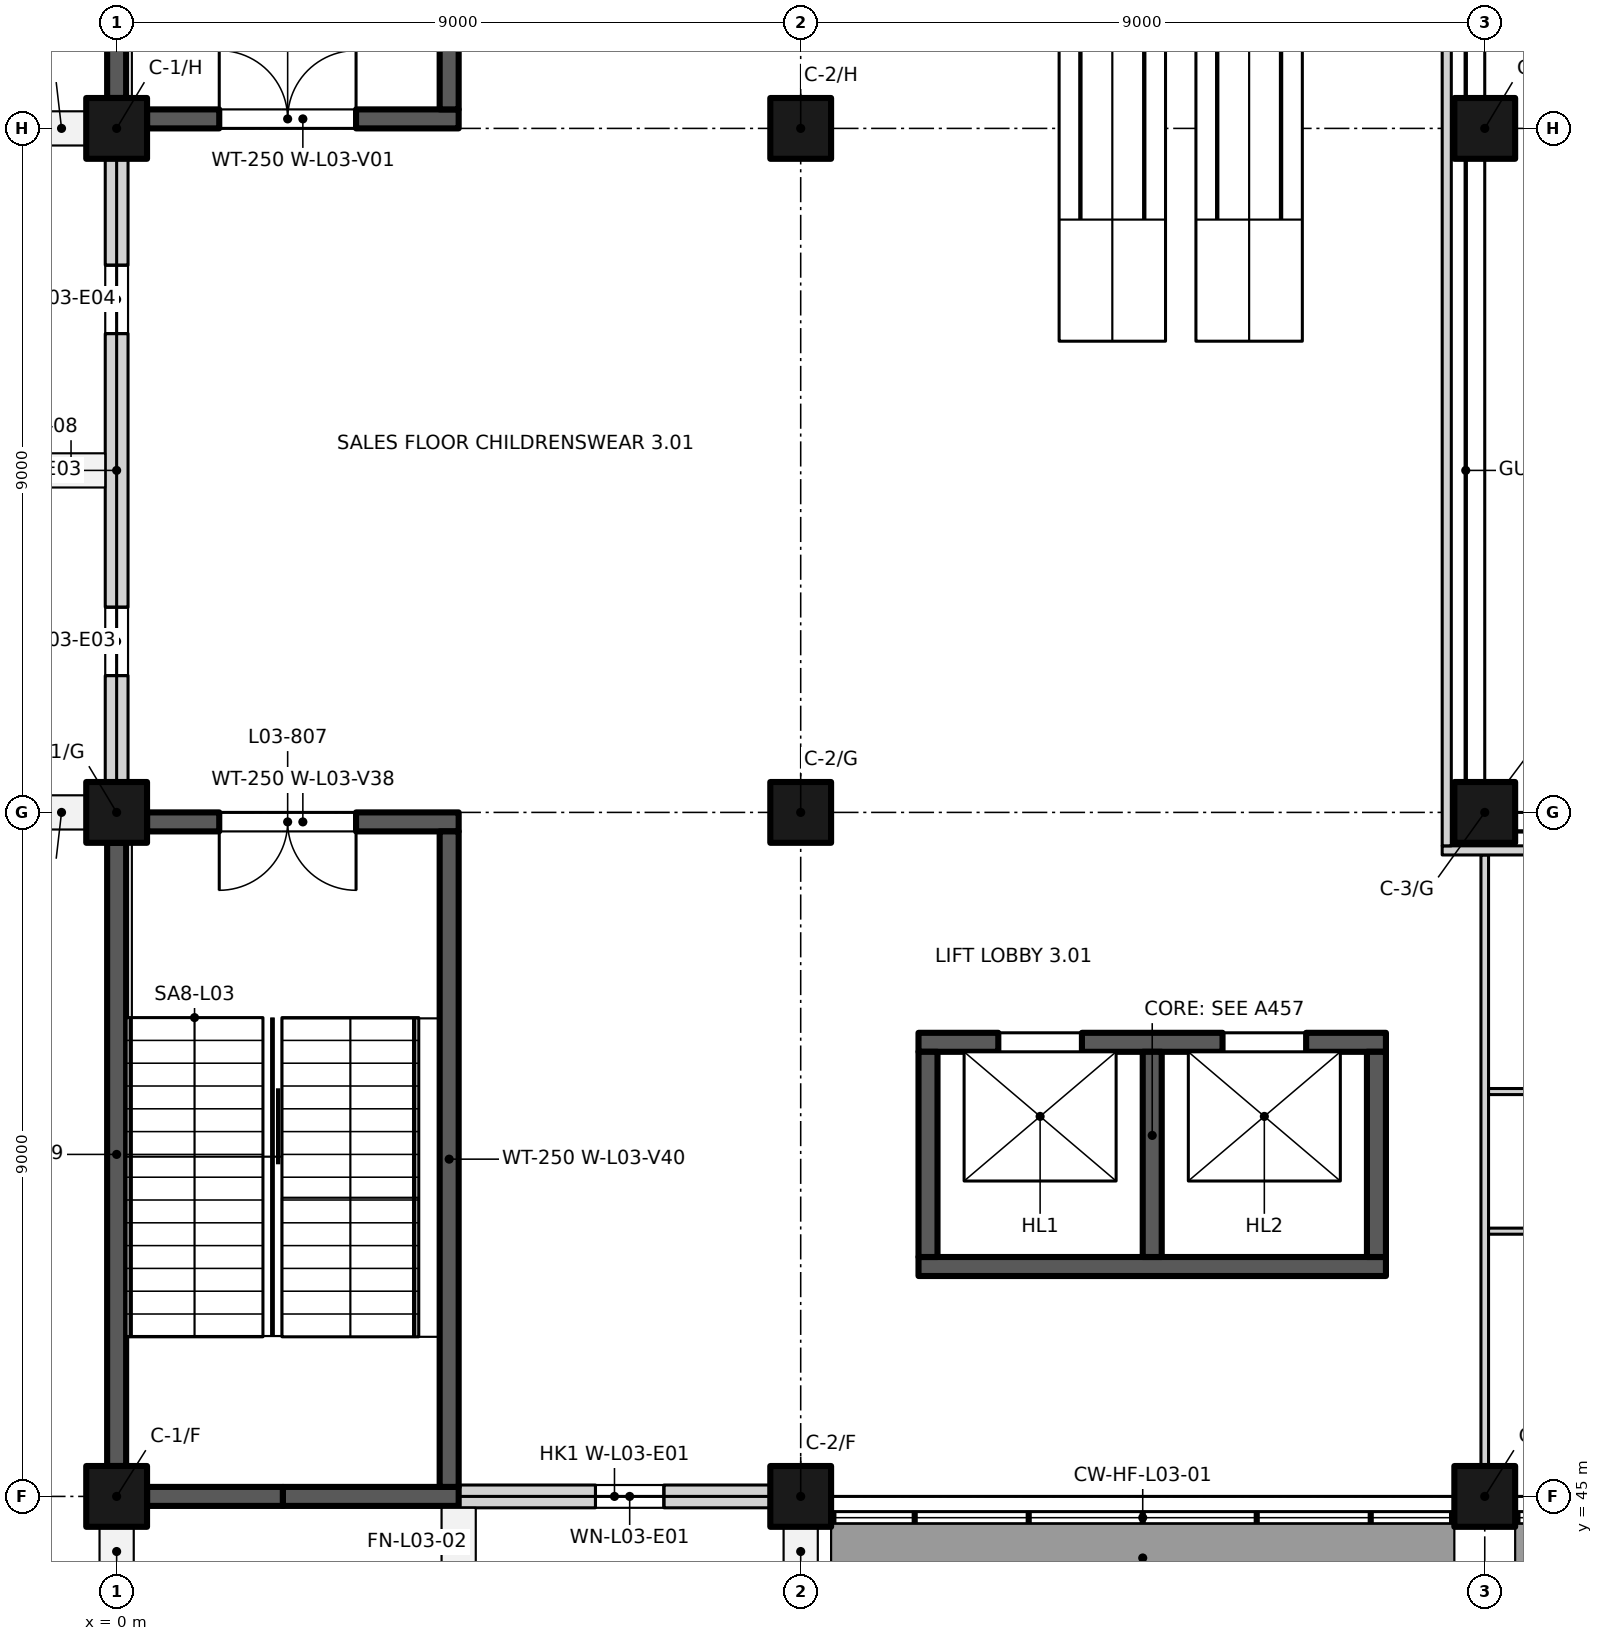
"""IFC4 building model, lengths in metres.
Left out: names, types, materials, properties, quantities, classifications, styles, units other than length and angle.
Written with IfcOpenShell. Run it as: python <this file> out.ifc"""

import sys

from ifc_helpers import new_model, si_unit, direction, frame, frame_2d, origin, origin_2d, place, context, subcontext, project, spatial, rectangle, extrude, element, fill, save


model = new_model("IFC4")
c1 = context("Model", 3, precision=1e-05, world=origin(), true_north=direction((0.0, 1.0)))
c2 = subcontext(c1, "Body", "Model", "MODEL_VIEW")
j1 = project(units=[si_unit("LENGTHUNIT", "METRE"), si_unit("PLANEANGLEUNIT", "RADIAN")], contexts=[c1])
p1 = place(None, origin())
s1 = spatial("IfcSite", under=j1, at=p1, CompositionType="ELEMENT")
p2 = place(p1, origin())
s2 = spatial("IfcBuilding", under=s1, at=p2, CompositionType="ELEMENT")
p3 = place(p2, frame((0.0, 0.0, 15.0)))
s3 = spatial("IfcBuildingStorey", under=s2, at=p3, CompositionType="ELEMENT", Elevation=15.0)
for number, where, z_axis, x_axis in (
    (1, (0.0, 45.0, 0.0), (0.0, 0.0, 1.0), (1.0, 0.0, 0.0)),
    (2, (9.0, 45.0, 0.0), (0.0, 0.0, 1.0), (1.0, 0.0, 0.0)),
    (3, (18.0, 45.0, 0.0), (0.0, 0.0, 1.0), (1.0, 0.0, 0.0)),
    (4, (0.0, 54.0, 0.0), (0.0, 0.0, 1.0), (1.0, 0.0, 0.0)),
    (5, (9.0, 54.0, 0.0), (0.0, 0.0, 1.0), (1.0, 0.0, 0.0)),
    (6, (18.0, 54.0, 0.0), (0.0, 0.0, 1.0), (1.0, 0.0, 0.0)),
    (7, (0.0, 63.0, 0.0), (0.0, 0.0, 1.0), (1.0, 0.0, 0.0)),
    (8, (9.0, 63.0, 0.0), (0.0, 0.0, 1.0), (1.0, 0.0, 0.0)),
    (9, (18.0, 63.0, 0.0), (0.0, 0.0, 1.0), (1.0, 0.0, 0.0)),
):
    element("IfcColumn", number, at=place(p3, frame(where, z_axis=z_axis, x_axis=x_axis)), inside=s3, PredefinedType="COLUMN", context=c2, shape_type="SweptSolid", body=[
        extrude(rectangle(XDim=0.8, YDim=0.8, at=origin_2d()), origin(), (0.0, 0.0, 1.0), 4.5),
    ])
p4 = place(p3, frame((0.4, 63.125, 0.0), z_axis=(0.0, 0.0, 1.0), x_axis=(1.0, 0.0, 0.0)))
e10 = element("IfcWall", 10, at=p4, inside=s3, PredefinedType="SHEAR", context=c2, shape_type="SweptSolid", body=[
    extrude(rectangle(XDim=4.1, YDim=0.25, at=frame_2d((2.05, 0.0))), origin(), (0.0, 0.0, 1.0), 4.5),
])
p5 = place(p4, frame((0.95, 0.0, 0.0)))
e11 = element("IfcOpeningElement", 11, at=p5, cuts=e10, PredefinedType="OPENING", context=c2, shape_type="SweptSolid", body=[
    extrude(rectangle(XDim=1.8, YDim=2.1, at=frame_2d((0.9, 1.05))), frame((0.0, 0.135, 0.0), z_axis=(0.0, -1.0, 0.0), x_axis=(1.0, 0.0, 0.0)), (0.0, 0.0, 1.0), 0.27),
])
p6 = place(p3, frame((0.0, 63.4, 0.0), z_axis=(0.0, 0.0, 1.0), x_axis=(0.0, 1.0, 0.0)))
e12 = element("IfcWall", 12, at=p6, inside=s3, PredefinedType="SHEAR", context=c2, shape_type="SweptSolid", body=[
    extrude(rectangle(XDim=8.2, YDim=0.25, at=frame_2d((4.1, 0.0))), origin(), (0.0, 0.0, 1.0), 4.5),
])
p7 = place(p3, frame((4.375, 63.25, 0.0), z_axis=(0.0, 0.0, 1.0), x_axis=(0.0, 1.0, 0.0)))
e13 = element("IfcWall", 13, at=p7, inside=s3, PredefinedType="SHEAR", context=c2, shape_type="SweptSolid", body=[
    extrude(rectangle(XDim=8.5, YDim=0.25, at=frame_2d((4.25, 0.0))), origin(), (0.0, 0.0, 1.0), 4.5),
])
p8 = place(p3, frame((0.4, 45.0, 0.0), z_axis=(0.0, 0.0, 1.0), x_axis=(1.0, 0.0, 0.0)))
e14 = element("IfcWall", 14, at=p8, inside=s3, PredefinedType="SHEAR", context=c2, shape_type="SweptSolid", body=[
    extrude(rectangle(XDim=1.788, YDim=0.25, at=frame_2d((0.894, 0.0))), origin(), (0.0, 0.0, 1.0), 4.5),
])
p9 = place(p3, frame((2.188, 45.0, 0.0), z_axis=(0.0, 0.0, 1.0), x_axis=(1.0, 0.0, 0.0)))
e15 = element("IfcWall", 15, at=p9, inside=s3, PredefinedType="SHEAR", context=c2, shape_type="SweptSolid", body=[
    extrude(rectangle(XDim=2.312, YDim=0.25, at=frame_2d((1.156, 0.0))), origin(), (0.0, 0.0, 1.0), 4.5),
])
p10 = place(p3, frame((0.4, 53.875, 0.0), z_axis=(0.0, 0.0, 1.0), x_axis=(1.0, 0.0, 0.0)))
e16 = element("IfcWall", 16, at=p10, inside=s3, PredefinedType="SHEAR", context=c2, shape_type="SweptSolid", body=[
    extrude(rectangle(XDim=4.1, YDim=0.25, at=frame_2d((2.05, 0.0))), origin(), (0.0, 0.0, 1.0), 4.5),
])
p11 = place(p10, frame((2.75, 0.0, 0.0), z_axis=(0.0, 0.0, 1.0), x_axis=(-1.0, 0.0, 0.0)))
e17 = element("IfcOpeningElement", 17, at=p11, cuts=e16, PredefinedType="OPENING", context=c2, shape_type="SweptSolid", body=[
    extrude(rectangle(XDim=1.8, YDim=2.1, at=frame_2d((0.9, 1.05))), frame((0.0, 0.135, 0.0), z_axis=(0.0, -1.0, 0.0), x_axis=(1.0, 0.0, 0.0)), (0.0, 0.0, 1.0), 0.27),
])
p12 = place(p3, frame((0.0, 45.4, 0.0), z_axis=(0.0, 0.0, 1.0), x_axis=(0.0, 1.0, 0.0)))
e18 = element("IfcWall", 18, at=p12, inside=s3, PredefinedType="SHEAR", context=c2, shape_type="SweptSolid", body=[
    extrude(rectangle(XDim=8.2, YDim=0.25, at=frame_2d((4.1, 0.0))), origin(), (0.0, 0.0, 1.0), 4.5),
])
p13 = place(p3, frame((4.375, 45.125, 0.0), z_axis=(0.0, 0.0, 1.0), x_axis=(0.0, 1.0, 0.0)))
e19 = element("IfcWall", 19, at=p13, inside=s3, PredefinedType="SHEAR", context=c2, shape_type="SweptSolid", body=[
    extrude(rectangle(XDim=8.625, YDim=0.25, at=frame_2d((4.312, 0.0))), origin(), (0.0, 0.0, 1.0), 4.5),
])
p14 = place(p3, frame((10.55, 50.975, 0.0), z_axis=(0.0, 0.0, 1.0), x_axis=(1.0, 0.0, 0.0)))
e20 = element("IfcWall", 20, at=p14, inside=s3, PredefinedType="SHEAR", context=c2, shape_type="SweptSolid", body=[
    extrude(rectangle(XDim=6.15, YDim=0.25, at=frame_2d((3.075, 0.0))), origin(), (0.0, 0.0, 1.0), 4.5),
])
p15 = place(p14, frame((1.05, 0.0, 0.0)))
e21 = element("IfcOpeningElement", 21, at=p15, cuts=e20, PredefinedType="OPENING", context=c2, shape_type="SweptSolid", body=[
    extrude(rectangle(XDim=1.1, YDim=2.1, at=frame_2d((0.55, 1.05))), frame((0.0, 0.135, 0.0), z_axis=(0.0, -1.0, 0.0), x_axis=(1.0, 0.0, 0.0)), (0.0, 0.0, 1.0), 0.27),
])
p16 = place(p14, frame((4.0, 0.0, 0.0)))
e22 = element("IfcOpeningElement", 22, at=p16, cuts=e20, PredefinedType="OPENING", context=c2, shape_type="SweptSolid", body=[
    extrude(rectangle(XDim=1.1, YDim=2.1, at=frame_2d((0.55, 1.05))), frame((0.0, 0.135, 0.0), z_axis=(0.0, -1.0, 0.0), x_axis=(1.0, 0.0, 0.0)), (0.0, 0.0, 1.0), 0.27),
])
p17 = place(p3, frame((10.55, 48.025, 0.0), z_axis=(0.0, 0.0, 1.0), x_axis=(1.0, 0.0, 0.0)))
e23 = element("IfcWall", 23, at=p17, inside=s3, PredefinedType="SHEAR", context=c2, shape_type="SweptSolid", body=[
    extrude(rectangle(XDim=6.15, YDim=0.25, at=frame_2d((3.075, 0.0))), origin(), (0.0, 0.0, 1.0), 4.5),
])
for number, where, z_axis, x_axis in (
    (24, (10.675, 48.15, 0.0), (0.0, 0.0, 1.0), (0.0, 1.0, 0.0)),
    (25, (13.625, 48.15, 0.0), (0.0, 0.0, 1.0), (0.0, 1.0, 0.0)),
    (26, (16.575, 48.15, 0.0), (0.0, 0.0, 1.0), (0.0, 1.0, 0.0)),
):
    element("IfcWall", number, at=place(p3, frame(where, z_axis=z_axis, x_axis=x_axis)), inside=s3, PredefinedType="SHEAR", context=c2, shape_type="SweptSolid", body=[
        extrude(rectangle(XDim=2.7, YDim=0.25, at=frame_2d((1.35, 0.0))), origin(), (0.0, 0.0, 1.0), 4.5),
    ])
p18 = place(p3, frame((8.6, 45.0, 0.0), z_axis=(0.0, 0.0, 1.0), x_axis=(-1.0, 0.0, 0.0)))
e27 = element("IfcWall", 27, at=p18, inside=s3, PredefinedType="SOLIDWALL", context=c2, shape_type="SweptSolid", body=[
    extrude(rectangle(XDim=4.1, YDim=0.3, at=frame_2d((2.05, 0.0))), origin(), (0.0, 0.0, 1.0), 3.7),
])
p19 = place(p18, frame((1.4, 0.0, 0.45)))
e28 = element("IfcOpeningElement", 28, at=p19, cuts=e27, PredefinedType="OPENING", context=c2, shape_type="SweptSolid", body=[
    extrude(rectangle(XDim=0.9, YDim=3.0, at=frame_2d((0.45, 1.5))), frame((0.0, 0.16, 0.0), z_axis=(0.0, -1.0, 0.0), x_axis=(1.0, 0.0, 0.0)), (0.0, 0.0, 1.0), 0.32),
])
p20 = place(p3, frame((0.0, 54.4, 0.0), z_axis=(0.0, 0.0, 1.0), x_axis=(0.0, 1.0, 0.0)))
e29 = element("IfcWall", 29, at=p20, inside=s3, PredefinedType="SOLIDWALL", context=c2, shape_type="SweptSolid", body=[
    extrude(rectangle(XDim=8.2, YDim=0.3, at=frame_2d((4.1, 0.0))), origin(), (0.0, 0.0, 1.0), 3.7),
])
p21 = place(p20, frame((1.4, 0.0, 0.45)))
e30 = element("IfcOpeningElement", 30, at=p21, cuts=e29, PredefinedType="OPENING", context=c2, shape_type="SweptSolid", body=[
    extrude(rectangle(XDim=0.9, YDim=3.0, at=frame_2d((0.45, 1.5))), frame((0.0, 0.16, 0.0), z_axis=(0.0, -1.0, 0.0), x_axis=(1.0, 0.0, 0.0)), (0.0, 0.0, 1.0), 0.32),
])
p22 = place(p20, frame((5.9, 0.0, 0.45)))
e31 = element("IfcOpeningElement", 31, at=p22, cuts=e29, PredefinedType="OPENING", context=c2, shape_type="SweptSolid", body=[
    extrude(rectangle(XDim=0.9, YDim=3.0, at=frame_2d((0.45, 1.5))), frame((0.0, 0.16, 0.0), z_axis=(0.0, -1.0, 0.0), x_axis=(1.0, 0.0, 0.0)), (0.0, 0.0, 1.0), 0.32),
])
p23 = place(p3, frame((18.0, 45.4, 0.0), z_axis=(0.0, 0.0, 1.0), x_axis=(0.0, 1.0, 0.0)))
e32 = element("IfcWall", 32, at=p23, inside=s3, PredefinedType="PARTITIONING", context=c2, shape_type="SweptSolid", body=[
    extrude(rectangle(XDim=8.04, YDim=0.1, at=frame_2d((4.02, 0.0))), origin(), (0.0, 0.0, 1.0), 3.7),
])
for number, where, z_axis, x_axis in (
    (33, (18.05, 48.49, 0.0), (0.0, 0.0, 1.0), (1.0, 0.0, 0.0)),
    (34, (18.05, 50.327, 0.0), (0.0, 0.0, 1.0), (1.0, 0.0, 0.0)),
):
    element("IfcWall", number, at=place(p3, frame(where, z_axis=z_axis, x_axis=x_axis)), inside=s3, PredefinedType="PARTITIONING", context=c2, shape_type="SweptSolid", body=[
        extrude(rectangle(XDim=5.9, YDim=0.08, at=frame_2d((2.95, 0.0))), origin(), (0.0, 0.0, 1.0), 3.7),
    ])
p24 = place(p3, frame((17.44, 53.5, 0.0), z_axis=(0.0, 0.0, 1.0), x_axis=(1.0, 0.0, 0.0)))
e35 = element("IfcWall", 35, at=p24, inside=s3, PredefinedType="PARTITIONING", context=c2, shape_type="SweptSolid", body=[
    extrude(rectangle(XDim=28.12, YDim=0.12, at=frame_2d((14.06, 0.0))), origin(), (0.0, 0.0, 1.0), 3.7),
])
p25 = place(p3, frame((17.5, 53.56, 0.0), z_axis=(0.0, 0.0, 1.0), x_axis=(0.0, 1.0, 0.0)))
e36 = element("IfcWall", 36, at=p25, inside=s3, PredefinedType="PARTITIONING", context=c2, shape_type="SweptSolid", body=[
    extrude(rectangle(XDim=36.565, YDim=0.12, at=frame_2d((18.282, 0.0))), origin(), (0.0, 0.0, 1.0), 3.7),
])
p26 = place(p5, origin())
e37 = element("IfcDoor", 37, at=p26, inside=s3, OperationType="DOUBLE_DOOR_SINGLE_SWING", PredefinedType="DOOR", context=c2, shape_type="SweptSolid", body=[
    extrude(rectangle(XDim=1.8, YDim=2.1, at=frame_2d((0.9, 1.05))), frame((0.0, 0.025, 0.0), z_axis=(0.0, -1.0, 0.0), x_axis=(1.0, 0.0, 0.0)), (0.0, 0.0, 1.0), 0.05),
])
fill(e11, e37)
p27 = place(p11, origin())
e38 = element("IfcDoor", 38, at=p27, inside=s3, OperationType="DOUBLE_DOOR_SINGLE_SWING", PredefinedType="DOOR", context=c2, shape_type="SweptSolid", body=[
    extrude(rectangle(XDim=1.8, YDim=2.1, at=frame_2d((0.9, 1.05))), frame((0.0, 0.025, 0.0), z_axis=(0.0, -1.0, 0.0), x_axis=(1.0, 0.0, 0.0)), (0.0, 0.0, 1.0), 0.05),
])
fill(e17, e38)
p28 = place(p15, origin())
e39 = element("IfcDoor", 39, at=p28, inside=s3, OperationType="DOUBLE_DOOR_SLIDING", PredefinedType="DOOR", context=c2, shape_type="SweptSolid", body=[
    extrude(rectangle(XDim=1.1, YDim=2.1, at=frame_2d((0.55, 1.05))), frame((0.0, 0.025, 0.0), z_axis=(0.0, -1.0, 0.0), x_axis=(1.0, 0.0, 0.0)), (0.0, 0.0, 1.0), 0.05),
])
fill(e21, e39)
p29 = place(p16, origin())
e40 = element("IfcDoor", 40, at=p29, inside=s3, OperationType="DOUBLE_DOOR_SLIDING", PredefinedType="DOOR", context=c2, shape_type="SweptSolid", body=[
    extrude(rectangle(XDim=1.1, YDim=2.1, at=frame_2d((0.55, 1.05))), frame((0.0, 0.025, 0.0), z_axis=(0.0, -1.0, 0.0), x_axis=(1.0, 0.0, 0.0)), (0.0, 0.0, 1.0), 0.05),
])
fill(e22, e40)
p30 = place(p19, origin())
e41 = element("IfcWindow", 41, at=p30, inside=s3, PartitioningType="SINGLE_PANEL", PredefinedType="WINDOW", context=c2, shape_type="SweptSolid", body=[
    extrude(rectangle(XDim=0.9, YDim=3.0, at=frame_2d((0.45, 1.5))), frame((0.0, -0.03, 0.0), z_axis=(0.0, -1.0, 0.0), x_axis=(1.0, 0.0, 0.0)), (0.0, 0.0, 1.0), 0.06),
])
fill(e28, e41)
p31 = place(p21, origin())
e42 = element("IfcWindow", 42, at=p31, inside=s3, PartitioningType="SINGLE_PANEL", PredefinedType="WINDOW", context=c2, shape_type="SweptSolid", body=[
    extrude(rectangle(XDim=0.9, YDim=3.0, at=frame_2d((0.45, 1.5))), frame((0.0, -0.03, 0.0), z_axis=(0.0, -1.0, 0.0), x_axis=(1.0, 0.0, 0.0)), (0.0, 0.0, 1.0), 0.06),
])
fill(e30, e42)
p32 = place(p22, origin())
e43 = element("IfcWindow", 43, at=p32, inside=s3, PartitioningType="SINGLE_PANEL", PredefinedType="WINDOW", context=c2, shape_type="SweptSolid", body=[
    extrude(rectangle(XDim=0.9, YDim=3.0, at=frame_2d((0.45, 1.5))), frame((0.0, -0.03, 0.0), z_axis=(0.0, -1.0, 0.0), x_axis=(1.0, 0.0, 0.0)), (0.0, 0.0, 1.0), 0.06),
])
fill(e31, e43)
save(model, sys.argv[1])
